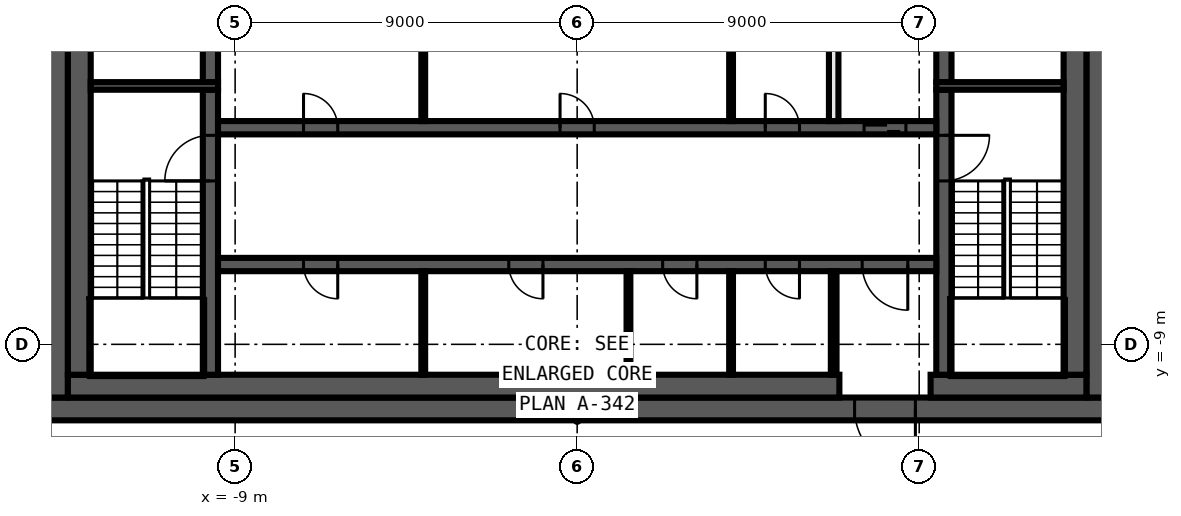
"""IFC4 building model, lengths in metres.
Left out: names, types, materials, properties, quantities, classifications, styles, units other than length and angle.
Written with IfcOpenShell. Run it as: python <this file> out.ifc"""

import sys

from ifc_helpers import new_model, si_unit, direction, frame, frame_2d, origin, place, context, subcontext, project, spatial, rectangle, extrude, element, fill, save


model = new_model("IFC4")
c1 = context("Model", 3, precision=1e-05, world=origin(), true_north=direction((0.0, 1.0)))
c2 = subcontext(c1, "Body", "Model", "MODEL_VIEW")
j1 = project(units=[si_unit("LENGTHUNIT", "METRE"), si_unit("PLANEANGLEUNIT", "RADIAN")], contexts=[c1])
p1 = place(None, origin())
s1 = spatial("IfcSite", under=j1, at=p1, CompositionType="ELEMENT")
p2 = place(p1, origin())
s2 = spatial("IfcBuilding", under=s1, at=p2, CompositionType="ELEMENT")
p3 = place(p2, frame((0.0, 0.0, 363.2)))
s3 = spatial("IfcBuildingStorey", under=s2, at=p3, CompositionType="ELEMENT", Elevation=363.2)
p4 = place(p3, frame((11.367, -20.469, 0.0), z_axis=(0.0, 0.0, 1.0), x_axis=(0.424125024155, 0.905603646131, 0.0)))
e1 = element("IfcWall", 1, at=p4, inside=s3, PredefinedType="SOLIDWALL", context=c2, shape_type="SweptSolid", body=[
    extrude(rectangle(XDim=28.801, YDim=0.25, at=frame_2d((14.401, 0.0))), origin(), (0.0, 0.0, 1.0), 3.8),
])
p5 = place(p3, frame((-11.138, 20.28, 0.0), z_axis=(0.0, 0.0, 1.0), x_axis=(-0.441342255748, -0.897338850876, 0.0)))
e2 = element("IfcWall", 2, at=p5, inside=s3, PredefinedType="SOLIDWALL", context=c2, shape_type="SweptSolid", body=[
    extrude(rectangle(XDim=28.805, YDim=0.25, at=frame_2d((14.403, 0.0))), origin(), (0.0, 0.0, 1.0), 3.8),
])
p6 = place(p3, frame((-23.851, -5.568, 0.0), z_axis=(0.0, 0.0, 1.0), x_axis=(0.701718568407, -0.712454244673, 0.0)))
e3 = element("IfcWall", 3, at=p6, inside=s3, PredefinedType="SOLIDWALL", context=c2, shape_type="SweptSolid", body=[
    extrude(rectangle(XDim=20.785, YDim=0.25, at=frame_2d((10.393, 0.0))), origin(), (0.0, 0.0, 1.0), 3.8),
])
p7 = place(p3, frame((14.0, -10.7, 0.0), z_axis=(0.0, 0.0, 1.0), x_axis=(-1.0, 0.0, 0.0)))
e4 = element("IfcWall", 4, at=p7, inside=s3, PredefinedType="SHEAR", context=c2, shape_type="SweptSolid", body=[
    extrude(rectangle(XDim=28.0, YDim=0.6, at=frame_2d((14.0, 0.0))), origin(), (0.0, 0.0, 1.0), 3.8),
])
p8 = place(p7, frame((5.1, 0.0, 0.0)))
e5 = element("IfcOpeningElement", 5, at=p8, cuts=e4, PredefinedType="OPENING", context=c2, shape_type="SweptSolid", body=[
    extrude(rectangle(XDim=1.6, YDim=2.1, at=frame_2d((0.8, 1.05))), frame((0.0, 0.31, 0.0), z_axis=(0.0, -1.0, 0.0), x_axis=(1.0, 0.0, 0.0)), (0.0, 0.0, 1.0), 0.62),
])
for number, where, z_axis, x_axis in (
    (6, (13.7, 10.4, 0.0), (0.0, 0.0, 1.0), (0.0, -1.0, 0.0)),
    (7, (-13.7, -10.4, 0.0), (0.0, 0.0, 1.0), (0.0, 1.0, 0.0)),
):
    element("IfcWall", number, at=place(p3, frame(where, z_axis=z_axis, x_axis=x_axis)), inside=s3, PredefinedType="SHEAR", context=c2, shape_type="SweptSolid", body=[
        extrude(rectangle(XDim=20.8, YDim=0.6, at=frame_2d((10.4, 0.0))), origin(), (0.0, 0.0, 1.0), 3.8),
    ])
p9 = place(p3, frame((13.4, -10.1, 0.0), z_axis=(0.0, 0.0, 1.0), x_axis=(-1.0, 0.0, 0.0)))
e8 = element("IfcWall", 8, at=p9, inside=s3, PredefinedType="SHEAR", context=c2, shape_type="SweptSolid", body=[
    extrude(rectangle(XDim=4.1, YDim=0.6, at=frame_2d((2.05, 0.0))), origin(), (0.0, 0.0, 1.0), 3.8),
])
p10 = place(p3, frame((6.9, -10.1, 0.0), z_axis=(0.0, 0.0, 1.0), x_axis=(-1.0, 0.0, 0.0)))
e9 = element("IfcWall", 9, at=p10, inside=s3, PredefinedType="SHEAR", context=c2, shape_type="SweptSolid", body=[
    extrude(rectangle(XDim=20.3, YDim=0.6, at=frame_2d((10.15, 0.0))), origin(), (0.0, 0.0, 1.0), 3.8),
])
for number, where, z_axis, x_axis in (
    (10, (13.1, 9.8, 0.0), (0.0, 0.0, 1.0), (0.0, -1.0, 0.0)),
    (11, (-13.1, -9.8, 0.0), (0.0, 0.0, 1.0), (0.0, 1.0, 0.0)),
):
    element("IfcWall", number, at=place(p3, frame(where, z_axis=z_axis, x_axis=x_axis)), inside=s3, PredefinedType="SHEAR", context=c2, shape_type="SweptSolid", body=[
        extrude(rectangle(XDim=19.6, YDim=0.6, at=frame_2d((9.8, 0.0))), origin(), (0.0, 0.0, 1.0), 3.8),
    ])
p11 = place(p3, frame((9.65, -2.3, 0.0), z_axis=(0.0, 0.0, 1.0), x_axis=(0.0, -1.0, 0.0)))
e12 = element("IfcWall", 12, at=p11, inside=s3, PredefinedType="SHEAR", context=c2, shape_type="SweptSolid", body=[
    extrude(rectangle(XDim=7.5, YDim=0.4, at=frame_2d((3.75, 0.0))), origin(), (0.0, 0.0, 1.0), 3.8),
])
p12 = place(p11, frame((1.2, 0.0, 0.0)))
e13 = element("IfcOpeningElement", 13, at=p12, cuts=e12, PredefinedType="OPENING", context=c2, shape_type="SweptSolid", body=[
    extrude(rectangle(XDim=1.2, YDim=2.1, at=frame_2d((0.6, 1.05))), frame((0.0, 0.21, 0.0), z_axis=(0.0, -1.0, 0.0), x_axis=(1.0, 0.0, 0.0)), (0.0, 0.0, 1.0), 0.42),
])
p13 = place(p3, frame((9.65, 2.1, 0.0), z_axis=(0.0, 0.0, 1.0), x_axis=(0.0, -1.0, 0.0)))
e14 = element("IfcWall", 14, at=p13, inside=s3, PredefinedType="SHEAR", context=c2, shape_type="SweptSolid", body=[
    extrude(rectangle(XDim=4.2, YDim=0.4, at=frame_2d((2.1, 0.0))), origin(), (0.0, 0.0, 1.0), 3.8),
])
p14 = place(p13, frame((0.15, 0.0, 0.0)))
e15 = element("IfcOpeningElement", 15, at=p14, cuts=e14, PredefinedType="OPENING", context=c2, shape_type="SweptSolid", body=[
    extrude(rectangle(XDim=0.9, YDim=2.1, at=frame_2d((0.45, 1.05))), frame((0.0, 0.21, 0.0), z_axis=(0.0, -1.0, 0.0), x_axis=(1.0, 0.0, 0.0)), (0.0, 0.0, 1.0), 0.42),
])
p15 = place(p3, frame((-9.65, -9.8, 0.0), z_axis=(0.0, 0.0, 1.0), x_axis=(0.0, 1.0, 0.0)))
e16 = element("IfcWall", 16, at=p15, inside=s3, PredefinedType="SHEAR", context=c2, shape_type="SweptSolid", body=[
    extrude(rectangle(XDim=7.5, YDim=0.4, at=frame_2d((3.75, 0.0))), origin(), (0.0, 0.0, 1.0), 3.8),
])
p16 = place(p15, frame((5.1, 0.0, 0.0)))
e17 = element("IfcOpeningElement", 17, at=p16, cuts=e16, PredefinedType="OPENING", context=c2, shape_type="SweptSolid", body=[
    extrude(rectangle(XDim=1.2, YDim=2.1, at=frame_2d((0.6, 1.05))), frame((0.0, 0.21, 0.0), z_axis=(0.0, -1.0, 0.0), x_axis=(1.0, 0.0, 0.0)), (0.0, 0.0, 1.0), 0.42),
])
p17 = place(p3, frame((-9.65, -2.1, 0.0), z_axis=(0.0, 0.0, 1.0), x_axis=(0.0, 1.0, 0.0)))
e18 = element("IfcWall", 18, at=p17, inside=s3, PredefinedType="SHEAR", context=c2, shape_type="SweptSolid", body=[
    extrude(rectangle(XDim=4.2, YDim=0.4, at=frame_2d((2.1, 0.0))), origin(), (0.0, 0.0, 1.0), 3.8),
])
for number, where, z_axis, x_axis in (
    (19, (9.45, -2.2, 0.0), (0.0, 0.0, 1.0), (1.0, 0.0, 0.0)),
    (20, (-9.45, -2.2, 0.0), (0.0, 0.0, 1.0), (-1.0, 0.0, 0.0)),
):
    element("IfcWall", number, at=place(p3, frame(where, z_axis=z_axis, x_axis=x_axis)), inside=s3, PredefinedType="SHEAR", context=c2, shape_type="SweptSolid", body=[
        extrude(rectangle(XDim=3.35, YDim=0.2, at=frame_2d((1.675, 0.0))), origin(), (0.0, 0.0, 1.0), 3.8),
    ])
p18 = place(p3, frame((-9.45, -3.3, 0.0), z_axis=(0.0, 0.0, 1.0), x_axis=(1.0, 0.0, 0.0)))
e21 = element("IfcWall", 21, at=p18, inside=s3, PredefinedType="SHEAR", context=c2, shape_type="SweptSolid", body=[
    extrude(rectangle(XDim=18.9, YDim=0.35, at=frame_2d((9.45, 0.0))), origin(), (0.0, 0.0, 1.0), 3.8),
])
p19 = place(p18, frame((17.0, 0.0, 0.0)))
e22 = element("IfcOpeningElement", 22, at=p19, cuts=e21, PredefinedType="OPENING", context=c2, shape_type="SweptSolid", body=[
    extrude(rectangle(XDim=1.1, YDim=2.1, at=frame_2d((0.55, 1.05))), frame((0.0, 0.185, 0.0), z_axis=(0.0, -1.0, 0.0), x_axis=(1.0, 0.0, 0.0)), (0.0, 0.0, 1.0), 0.37),
])
p20 = place(p18, frame((2.25, 0.0, 0.0)))
e23 = element("IfcOpeningElement", 23, at=p20, cuts=e21, PredefinedType="OPENING", context=c2, shape_type="SweptSolid", body=[
    extrude(rectangle(XDim=0.9, YDim=2.1, at=frame_2d((0.45, 1.05))), frame((0.0, 0.185, 0.0), z_axis=(0.0, -1.0, 0.0), x_axis=(1.0, 0.0, 0.0)), (0.0, 0.0, 1.0), 0.37),
])
p21 = place(p18, frame((9.0, 0.0, 0.0)))
e24 = element("IfcOpeningElement", 24, at=p21, cuts=e21, PredefinedType="OPENING", context=c2, shape_type="SweptSolid", body=[
    extrude(rectangle(XDim=0.9, YDim=2.1, at=frame_2d((0.45, 1.05))), frame((0.0, 0.185, 0.0), z_axis=(0.0, -1.0, 0.0), x_axis=(1.0, 0.0, 0.0)), (0.0, 0.0, 1.0), 0.37),
])
p22 = place(p18, frame((14.4, 0.0, 0.0)))
e25 = element("IfcOpeningElement", 25, at=p22, cuts=e21, PredefinedType="OPENING", context=c2, shape_type="SweptSolid", body=[
    extrude(rectangle(XDim=0.9, YDim=2.1, at=frame_2d((0.45, 1.05))), frame((0.0, 0.185, 0.0), z_axis=(0.0, -1.0, 0.0), x_axis=(1.0, 0.0, 0.0)), (0.0, 0.0, 1.0), 0.37),
])
p23 = place(p3, frame((9.45, -6.9, 0.0), z_axis=(0.0, 0.0, 1.0), x_axis=(-1.0, 0.0, 0.0)))
e26 = element("IfcWall", 26, at=p23, inside=s3, PredefinedType="SHEAR", context=c2, shape_type="SweptSolid", body=[
    extrude(rectangle(XDim=18.9, YDim=0.35, at=frame_2d((9.45, 0.0))), origin(), (0.0, 0.0, 1.0), 3.8),
])
p24 = place(p23, frame((0.75, 0.0, 0.0)))
e27 = element("IfcOpeningElement", 27, at=p24, cuts=e26, PredefinedType="OPENING", context=c2, shape_type="SweptSolid", body=[
    extrude(rectangle(XDim=1.2, YDim=2.1, at=frame_2d((0.6, 1.05))), frame((0.0, 0.185, 0.0), z_axis=(0.0, -1.0, 0.0), x_axis=(1.0, 0.0, 0.0)), (0.0, 0.0, 1.0), 0.37),
])
p25 = place(p23, frame((15.75, 0.0, 0.0)))
e28 = element("IfcOpeningElement", 28, at=p25, cuts=e26, PredefinedType="OPENING", context=c2, shape_type="SweptSolid", body=[
    extrude(rectangle(XDim=0.9, YDim=2.1, at=frame_2d((0.45, 1.05))), frame((0.0, 0.185, 0.0), z_axis=(0.0, -1.0, 0.0), x_axis=(1.0, 0.0, 0.0)), (0.0, 0.0, 1.0), 0.37),
])
p26 = place(p23, frame((10.35, 0.0, 0.0)))
e29 = element("IfcOpeningElement", 29, at=p26, cuts=e26, PredefinedType="OPENING", context=c2, shape_type="SweptSolid", body=[
    extrude(rectangle(XDim=0.9, YDim=2.1, at=frame_2d((0.45, 1.05))), frame((0.0, 0.185, 0.0), z_axis=(0.0, -1.0, 0.0), x_axis=(1.0, 0.0, 0.0)), (0.0, 0.0, 1.0), 0.37),
])
p27 = place(p23, frame((6.3, 0.0, 0.0)))
e30 = element("IfcOpeningElement", 30, at=p27, cuts=e26, PredefinedType="OPENING", context=c2, shape_type="SweptSolid", body=[
    extrude(rectangle(XDim=0.9, YDim=2.1, at=frame_2d((0.45, 1.05))), frame((0.0, 0.185, 0.0), z_axis=(0.0, -1.0, 0.0), x_axis=(1.0, 0.0, 0.0)), (0.0, 0.0, 1.0), 0.37),
])
p28 = place(p23, frame((3.6, 0.0, 0.0)))
e31 = element("IfcOpeningElement", 31, at=p28, cuts=e26, PredefinedType="OPENING", context=c2, shape_type="SweptSolid", body=[
    extrude(rectangle(XDim=0.9, YDim=2.1, at=frame_2d((0.45, 1.05))), frame((0.0, 0.185, 0.0), z_axis=(0.0, -1.0, 0.0), x_axis=(1.0, 0.0, 0.0)), (0.0, 0.0, 1.0), 0.37),
])
p29 = place(p3, frame((6.75, -9.8, 0.0), z_axis=(0.0, 0.0, 1.0), x_axis=(0.0, 1.0, 0.0)))
e32 = element("IfcWall", 32, at=p29, inside=s3, PredefinedType="PARTITIONING", context=c2, shape_type="SweptSolid", body=[
    extrude(rectangle(XDim=2.725, YDim=0.15, at=frame_2d((1.363, 0.0))), origin(), (0.0, 0.0, 1.0), 3.8),
])
p30 = place(p3, frame((6.75, -3.125, 0.0), z_axis=(0.0, 0.0, 1.0), x_axis=(0.0, 1.0, 0.0)))
e33 = element("IfcWall", 33, at=p30, inside=s3, PredefinedType="SOLIDWALL", context=c2, shape_type="SweptSolid", body=[
    extrude(rectangle(XDim=2.725, YDim=0.25, at=frame_2d((1.363, 0.0))), origin(), (0.0, 0.0, 1.0), 3.8),
])
for number, where, z_axis, x_axis in (
    (34, (4.05, -9.8, 0.0), (0.0, 0.0, 1.0), (0.0, 1.0, 0.0)),
    (35, (4.05, -3.125, 0.0), (0.0, 0.0, 1.0), (0.0, 1.0, 0.0)),
    (36, (1.35, -9.8, 0.0), (0.0, 0.0, 1.0), (0.0, 1.0, 0.0)),
    (37, (-4.05, -9.8, 0.0), (0.0, 0.0, 1.0), (0.0, 1.0, 0.0)),
    (38, (-4.05, -3.125, 0.0), (0.0, 0.0, 1.0), (0.0, 1.0, 0.0)),
):
    element("IfcWall", number, at=place(p3, frame(where, z_axis=z_axis, x_axis=x_axis)), inside=s3, PredefinedType="PARTITIONING", context=c2, shape_type="SweptSolid", body=[
        extrude(rectangle(XDim=2.725, YDim=0.1, at=frame_2d((1.363, 0.0))), origin(), (0.0, 0.0, 1.0), 3.8),
    ])
p31 = place(p19, origin())
e39 = element("IfcDoor", 39, at=p31, inside=s3, OperationType="DOUBLE_DOOR_SLIDING", PredefinedType="DOOR", context=c2, shape_type="SweptSolid", body=[
    extrude(rectangle(XDim=1.1, YDim=2.1, at=frame_2d((0.55, 1.05))), frame((0.0, 0.025, 0.0), z_axis=(0.0, -1.0, 0.0), x_axis=(1.0, 0.0, 0.0)), (0.0, 0.0, 1.0), 0.05),
])
fill(e22, e39)
p32 = place(p8, origin())
e40 = element("IfcDoor", 40, at=p32, inside=s3, OperationType="DOUBLE_DOOR_SINGLE_SWING", PredefinedType="DOOR", context=c2, shape_type="SweptSolid", body=[
    extrude(rectangle(XDim=1.6, YDim=2.1, at=frame_2d((0.8, 1.05))), frame((0.0, 0.025, 0.0), z_axis=(0.0, -1.0, 0.0), x_axis=(1.0, 0.0, 0.0)), (0.0, 0.0, 1.0), 0.05),
])
fill(e5, e40)
p33 = place(p24, origin())
e41 = element("IfcDoor", 41, at=p33, inside=s3, OperationType="SINGLE_SWING_LEFT", PredefinedType="DOOR", context=c2, shape_type="SweptSolid", body=[
    extrude(rectangle(XDim=1.2, YDim=2.1, at=frame_2d((0.6, 1.05))), frame((0.0, 0.025, 0.0), z_axis=(0.0, -1.0, 0.0), x_axis=(1.0, 0.0, 0.0)), (0.0, 0.0, 1.0), 0.05),
])
fill(e27, e41)
p34 = place(p20, origin())
e42 = element("IfcDoor", 42, at=p34, inside=s3, OperationType="SINGLE_SWING_LEFT", PredefinedType="DOOR", context=c2, shape_type="SweptSolid", body=[
    extrude(rectangle(XDim=0.9, YDim=2.1, at=frame_2d((0.45, 1.05))), frame((0.0, 0.025, 0.0), z_axis=(0.0, -1.0, 0.0), x_axis=(1.0, 0.0, 0.0)), (0.0, 0.0, 1.0), 0.05),
])
fill(e23, e42)
p35 = place(p21, origin())
e43 = element("IfcDoor", 43, at=p35, inside=s3, OperationType="SINGLE_SWING_RIGHT", PredefinedType="DOOR", context=c2, shape_type="SweptSolid", body=[
    extrude(rectangle(XDim=0.9, YDim=2.1, at=frame_2d((0.45, 1.05))), frame((0.0, 0.025, 0.0), z_axis=(0.0, -1.0, 0.0), x_axis=(1.0, 0.0, 0.0)), (0.0, 0.0, 1.0), 0.05),
])
fill(e24, e43)
p36 = place(p22, origin())
e44 = element("IfcDoor", 44, at=p36, inside=s3, OperationType="SINGLE_SWING_LEFT", PredefinedType="DOOR", context=c2, shape_type="SweptSolid", body=[
    extrude(rectangle(XDim=0.9, YDim=2.1, at=frame_2d((0.45, 1.05))), frame((0.0, 0.025, 0.0), z_axis=(0.0, -1.0, 0.0), x_axis=(1.0, 0.0, 0.0)), (0.0, 0.0, 1.0), 0.05),
])
fill(e25, e44)
p37 = place(p25, origin())
e45 = element("IfcDoor", 45, at=p37, inside=s3, OperationType="SINGLE_SWING_RIGHT", PredefinedType="DOOR", context=c2, shape_type="SweptSolid", body=[
    extrude(rectangle(XDim=0.9, YDim=2.1, at=frame_2d((0.45, 1.05))), frame((0.0, 0.025, 0.0), z_axis=(0.0, -1.0, 0.0), x_axis=(1.0, 0.0, 0.0)), (0.0, 0.0, 1.0), 0.05),
])
fill(e28, e45)
p38 = place(p26, origin())
e46 = element("IfcDoor", 46, at=p38, inside=s3, OperationType="SINGLE_SWING_LEFT", PredefinedType="DOOR", context=c2, shape_type="SweptSolid", body=[
    extrude(rectangle(XDim=0.9, YDim=2.1, at=frame_2d((0.45, 1.05))), frame((0.0, 0.025, 0.0), z_axis=(0.0, -1.0, 0.0), x_axis=(1.0, 0.0, 0.0)), (0.0, 0.0, 1.0), 0.05),
])
fill(e29, e46)
p39 = place(p27, origin())
e47 = element("IfcDoor", 47, at=p39, inside=s3, OperationType="SINGLE_SWING_RIGHT", PredefinedType="DOOR", context=c2, shape_type="SweptSolid", body=[
    extrude(rectangle(XDim=0.9, YDim=2.1, at=frame_2d((0.45, 1.05))), frame((0.0, 0.025, 0.0), z_axis=(0.0, -1.0, 0.0), x_axis=(1.0, 0.0, 0.0)), (0.0, 0.0, 1.0), 0.05),
])
fill(e30, e47)
p40 = place(p28, origin())
e48 = element("IfcDoor", 48, at=p40, inside=s3, OperationType="SINGLE_SWING_LEFT", PredefinedType="DOOR", context=c2, shape_type="SweptSolid", body=[
    extrude(rectangle(XDim=0.9, YDim=2.1, at=frame_2d((0.45, 1.05))), frame((0.0, 0.025, 0.0), z_axis=(0.0, -1.0, 0.0), x_axis=(1.0, 0.0, 0.0)), (0.0, 0.0, 1.0), 0.05),
])
fill(e31, e48)
p41 = place(p12, origin())
e49 = element("IfcDoor", 49, at=p41, inside=s3, OperationType="SINGLE_SWING_RIGHT", PredefinedType="DOOR", context=c2, shape_type="SweptSolid", body=[
    extrude(rectangle(XDim=1.2, YDim=2.1, at=frame_2d((0.6, 1.05))), frame((0.0, 0.025, 0.0), z_axis=(0.0, -1.0, 0.0), x_axis=(1.0, 0.0, 0.0)), (0.0, 0.0, 1.0), 0.05),
])
fill(e13, e49)
p42 = place(p16, origin())
e50 = element("IfcDoor", 50, at=p42, inside=s3, OperationType="SINGLE_SWING_LEFT", PredefinedType="DOOR", context=c2, shape_type="SweptSolid", body=[
    extrude(rectangle(XDim=1.2, YDim=2.1, at=frame_2d((0.6, 1.05))), frame((0.0, 0.025, 0.0), z_axis=(0.0, -1.0, 0.0), x_axis=(1.0, 0.0, 0.0)), (0.0, 0.0, 1.0), 0.05),
])
fill(e17, e50)
save(model, sys.argv[1])
